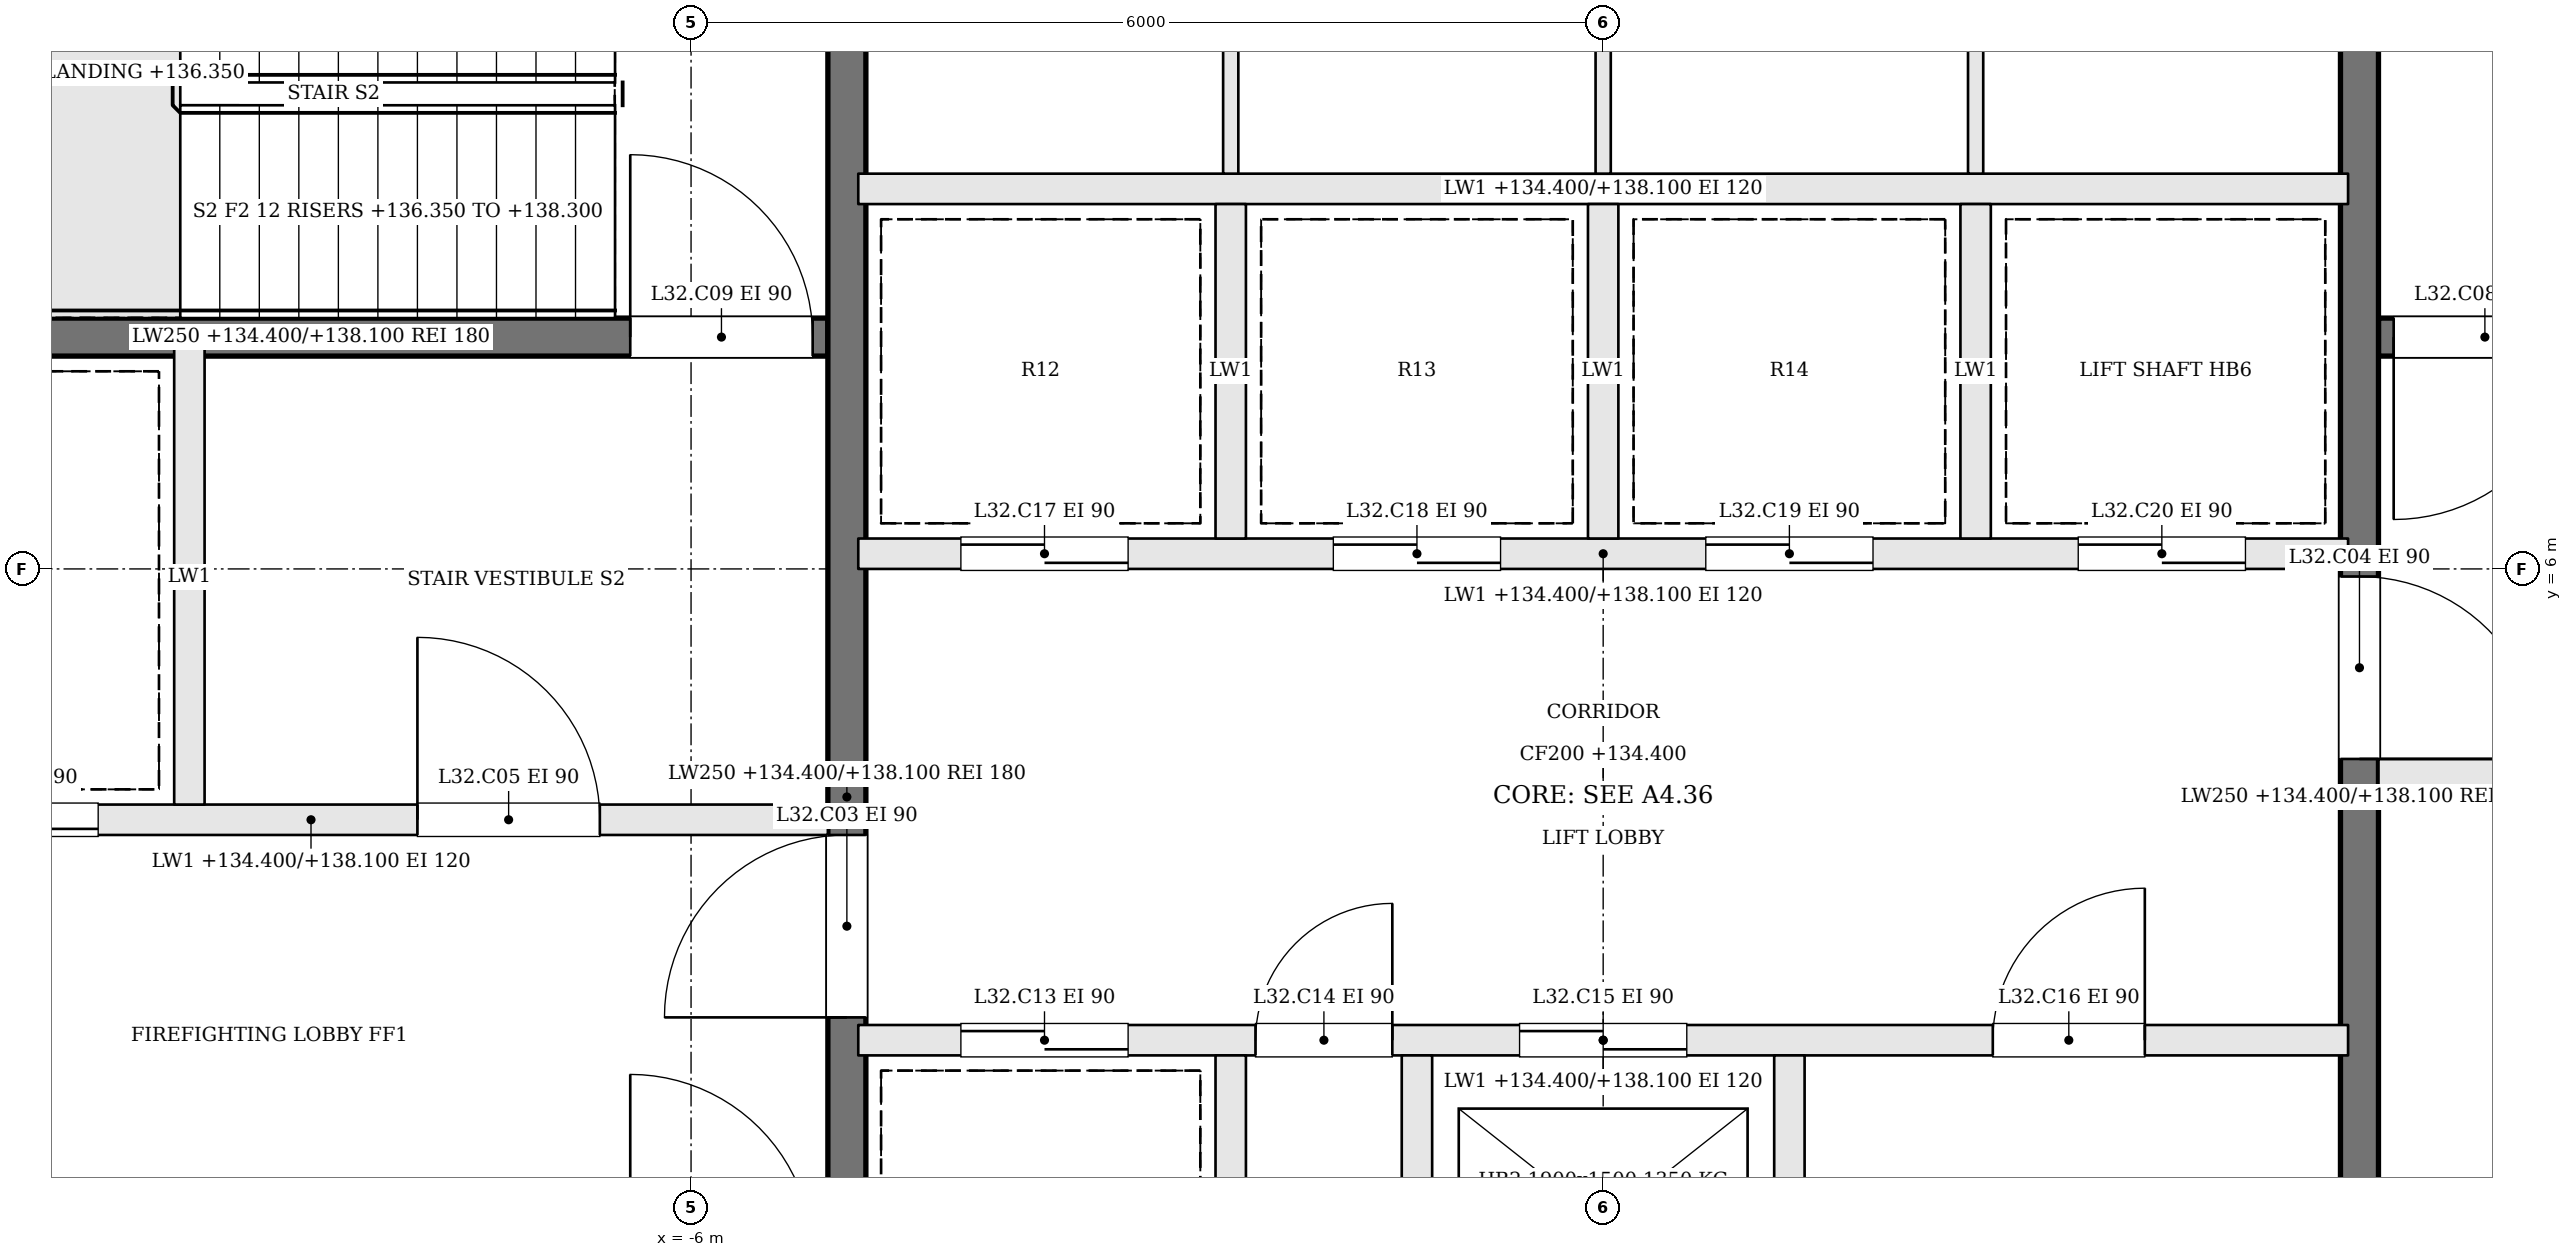
"""IFC4 building model, lengths in metres.
Left out: names, types, materials, properties, quantities, classifications, styles, units other than length and angle.
Written with IfcOpenShell. Run it as: python <this file> out.ifc"""

import sys

from ifc_helpers import new_model, si_unit, direction, frame, frame_2d, origin, place, context, subcontext, project, spatial, rectangle, extrude, element, fill, save


model = new_model("IFC4")
c1 = context("Model", 3, precision=1e-05, world=origin(), true_north=direction((0.0, 1.0)))
c2 = subcontext(c1, "Body", "Model", "MODEL_VIEW")
j1 = project(units=[si_unit("LENGTHUNIT", "METRE"), si_unit("PLANEANGLEUNIT", "RADIAN")], contexts=[c1])
p1 = place(None, origin())
s1 = spatial("IfcSite", under=j1, at=p1, CompositionType="ELEMENT")
p2 = place(p1, origin())
s2 = spatial("IfcBuilding", under=s1, at=p2, CompositionType="ELEMENT")
p3 = place(p2, frame((0.0, 0.0, 134.4)))
s3 = spatial("IfcBuildingStorey", under=s2, at=p3, CompositionType="ELEMENT", Elevation=134.4)
p4 = place(p3, frame((11.9, 7.525, 0.0), z_axis=(0.0, 0.0, 1.0), x_axis=(-1.0, 0.0, 0.0)))
e1 = element("IfcWall", 1, at=p4, inside=s3, PredefinedType="SOLIDWALL", context=c2, shape_type="SweptSolid", body=[
    extrude(rectangle(XDim=6.8, YDim=0.25, at=frame_2d((3.4, 0.0))), origin(), (0.0, 0.0, 1.0), 3.7),
])
p5 = place(p4, frame((5.5, 0.0, 0.0)))
e2 = element("IfcOpeningElement", 2, at=p5, cuts=e1, PredefinedType="OPENING", context=c2, shape_type="SweptSolid", body=[
    extrude(rectangle(XDim=1.2, YDim=2.1, at=frame_2d((0.6, 1.05))), frame((0.0, 0.135, 0.0), z_axis=(0.0, -1.0, 0.0), x_axis=(1.0, 0.0, 0.0)), (0.0, 0.0, 1.0), 0.27),
])
p6 = place(p3, frame((-11.9, 4.35, 0.0), z_axis=(0.0, 0.0, 1.0), x_axis=(1.0, 0.0, 0.0)))
e3 = element("IfcWall", 3, at=p6, inside=s3, PredefinedType="SOLIDWALL", context=c2, shape_type="SweptSolid", body=[
    extrude(rectangle(XDim=6.8, YDim=0.2, at=frame_2d((3.4, 0.0))), origin(), (0.0, 0.0, 1.0), 3.7),
])
p7 = place(p6, frame((4.1, 0.0, 0.0)))
e4 = element("IfcOpeningElement", 4, at=p7, cuts=e3, PredefinedType="OPENING", context=c2, shape_type="SweptSolid", body=[
    extrude(rectangle(XDim=1.2, YDim=2.1, at=frame_2d((0.6, 1.05))), frame((0.0, 0.11, 0.0), z_axis=(0.0, -1.0, 0.0), x_axis=(1.0, 0.0, 0.0)), (0.0, 0.0, 1.0), 0.22),
])
p8 = place(p6, frame((0.8, 0.0, 0.0)))
e5 = element("IfcOpeningElement", 5, at=p8, cuts=e3, PredefinedType="OPENING", context=c2, shape_type="SweptSolid", body=[
    extrude(rectangle(XDim=1.2, YDim=2.1, at=frame_2d((0.6, 1.05))), frame((0.0, 0.11, 0.0), z_axis=(0.0, -1.0, 0.0), x_axis=(1.0, 0.0, 0.0)), (0.0, 0.0, 1.0), 0.22),
])
p9 = place(p3, frame((11.9, 4.65, 0.0), z_axis=(0.0, 0.0, 1.0), x_axis=(-1.0, 0.0, 0.0)))
e6 = element("IfcWall", 6, at=p9, inside=s3, PredefinedType="SOLIDWALL", context=c2, shape_type="SweptSolid", body=[
    extrude(rectangle(XDim=6.8, YDim=0.2, at=frame_2d((3.4, 0.0))), origin(), (0.0, 0.0, 1.0), 3.7),
])
p10 = place(p9, frame((4.1, 0.0, 0.0)))
e7 = element("IfcOpeningElement", 7, at=p10, cuts=e6, PredefinedType="OPENING", context=c2, shape_type="SweptSolid", body=[
    extrude(rectangle(XDim=1.2, YDim=2.1, at=frame_2d((0.6, 1.05))), frame((0.0, 0.11, 0.0), z_axis=(0.0, -1.0, 0.0), x_axis=(1.0, 0.0, 0.0)), (0.0, 0.0, 1.0), 0.22),
])
p11 = place(p9, frame((0.8, 0.0, 0.0)))
e8 = element("IfcOpeningElement", 8, at=p11, cuts=e6, PredefinedType="OPENING", context=c2, shape_type="SweptSolid", body=[
    extrude(rectangle(XDim=1.2, YDim=2.1, at=frame_2d((0.6, 1.05))), frame((0.0, 0.11, 0.0), z_axis=(0.0, -1.0, 0.0), x_axis=(1.0, 0.0, 0.0)), (0.0, 0.0, 1.0), 0.22),
])
p12 = place(p3, frame((-11.9, 7.525, 0.0), z_axis=(0.0, 0.0, 1.0), x_axis=(1.0, 0.0, 0.0)))
e9 = element("IfcWall", 9, at=p12, inside=s3, PredefinedType="SOLIDWALL", context=c2, shape_type="SweptSolid", body=[
    extrude(rectangle(XDim=6.8, YDim=0.25, at=frame_2d((3.4, 0.0))), origin(), (0.0, 0.0, 1.0), 3.7),
])
p13 = place(p12, frame((5.5, 0.0, 0.0)))
e10 = element("IfcOpeningElement", 10, at=p13, cuts=e9, PredefinedType="OPENING", context=c2, shape_type="SweptSolid", body=[
    extrude(rectangle(XDim=1.2, YDim=2.1, at=frame_2d((0.6, 1.05))), frame((0.0, 0.135, 0.0), z_axis=(0.0, -1.0, 0.0), x_axis=(1.0, 0.0, 0.0)), (0.0, 0.0, 1.0), 0.27),
])
p14 = place(p3, frame((-9.3, 4.45, 0.0), z_axis=(0.0, 0.0, 1.0), x_axis=(0.0, 1.0, 0.0)))
e11 = element("IfcWall", 11, at=p14, inside=s3, PredefinedType="SOLIDWALL", context=c2, shape_type="SweptSolid", body=[
    extrude(rectangle(XDim=3.0, YDim=0.2, at=frame_2d((1.5, 0.0))), origin(), (0.0, 0.0, 1.0), 3.7),
])
p15 = place(p3, frame((-4.975, -1.9, 0.0), z_axis=(0.0, 0.0, 1.0), x_axis=(0.0, 1.0, 0.0)))
e12 = element("IfcWall", 12, at=p15, inside=s3, PredefinedType="SOLIDWALL", context=c2, shape_type="SweptSolid", body=[
    extrude(rectangle(XDim=12.8, YDim=0.25, at=frame_2d((6.4, 0.0))), origin(), (0.0, 0.0, 1.0), 3.7),
])
p16 = place(p15, frame((4.95, 0.0, 0.0)))
e13 = element("IfcOpeningElement", 13, at=p16, cuts=e12, PredefinedType="OPENING", context=c2, shape_type="SweptSolid", body=[
    extrude(rectangle(XDim=1.2, YDim=2.1, at=frame_2d((0.6, 1.05))), frame((0.0, 0.135, 0.0), z_axis=(0.0, -1.0, 0.0), x_axis=(1.0, 0.0, 0.0)), (0.0, 0.0, 1.0), 0.27),
])
p17 = place(p3, frame((4.975, 10.9, 0.0), z_axis=(0.0, 0.0, 1.0), x_axis=(0.0, -1.0, 0.0)))
e14 = element("IfcWall", 14, at=p17, inside=s3, PredefinedType="SOLIDWALL", context=c2, shape_type="SweptSolid", body=[
    extrude(rectangle(XDim=12.8, YDim=0.25, at=frame_2d((6.4, 0.0))), origin(), (0.0, 0.0, 1.0), 3.7),
])
p18 = place(p17, frame((4.95, 0.0, 0.0)))
e15 = element("IfcOpeningElement", 15, at=p18, cuts=e14, PredefinedType="OPENING", context=c2, shape_type="SweptSolid", body=[
    extrude(rectangle(XDim=1.2, YDim=2.1, at=frame_2d((0.6, 1.05))), frame((0.0, 0.135, 0.0), z_axis=(0.0, -1.0, 0.0), x_axis=(1.0, 0.0, 0.0)), (0.0, 0.0, 1.0), 0.27),
])
p19 = place(p3, frame((-4.9, 2.9, 0.0), z_axis=(0.0, 0.0, 1.0), x_axis=(1.0, 0.0, 0.0)))
e16 = element("IfcWall", 16, at=p19, inside=s3, PredefinedType="SOLIDWALL", context=c2, shape_type="SweptSolid", body=[
    extrude(rectangle(XDim=9.8, YDim=0.2, at=frame_2d((4.9, 0.0))), origin(), (0.0, 0.0, 1.0), 3.7),
])
p20 = place(p19, frame((0.675, 0.0, 0.0)))
e17 = element("IfcOpeningElement", 17, at=p20, cuts=e16, PredefinedType="OPENING", context=c2, shape_type="SweptSolid", body=[
    extrude(rectangle(XDim=1.1, YDim=2.1, at=frame_2d((0.55, 1.05))), frame((0.0, 0.11, 0.0), z_axis=(0.0, -1.0, 0.0), x_axis=(1.0, 0.0, 0.0)), (0.0, 0.0, 1.0), 0.22),
])
p21 = place(p19, frame((2.613, 0.0, 0.0)))
e18 = element("IfcOpeningElement", 18, at=p21, cuts=e16, PredefinedType="OPENING", context=c2, shape_type="SweptSolid", body=[
    extrude(rectangle(XDim=0.9, YDim=2.1, at=frame_2d((0.45, 1.05))), frame((0.0, 0.11, 0.0), z_axis=(0.0, -1.0, 0.0), x_axis=(1.0, 0.0, 0.0)), (0.0, 0.0, 1.0), 0.22),
])
p22 = place(p19, frame((4.35, 0.0, 0.0)))
e19 = element("IfcOpeningElement", 19, at=p22, cuts=e16, PredefinedType="OPENING", context=c2, shape_type="SweptSolid", body=[
    extrude(rectangle(XDim=1.1, YDim=2.1, at=frame_2d((0.55, 1.05))), frame((0.0, 0.11, 0.0), z_axis=(0.0, -1.0, 0.0), x_axis=(1.0, 0.0, 0.0)), (0.0, 0.0, 1.0), 0.22),
])
p23 = place(p19, frame((7.463, 0.0, 0.0)))
e20 = element("IfcOpeningElement", 20, at=p23, cuts=e16, PredefinedType="OPENING", context=c2, shape_type="SweptSolid", body=[
    extrude(rectangle(XDim=1.0, YDim=2.1, at=frame_2d((0.5, 1.05))), frame((0.0, 0.11, 0.0), z_axis=(0.0, -1.0, 0.0), x_axis=(1.0, 0.0, 0.0)), (0.0, 0.0, 1.0), 0.22),
])
p24 = place(p3, frame((-4.9, 6.1, 0.0), z_axis=(0.0, 0.0, 1.0), x_axis=(1.0, 0.0, 0.0)))
e21 = element("IfcWall", 21, at=p24, inside=s3, PredefinedType="SOLIDWALL", context=c2, shape_type="SweptSolid", body=[
    extrude(rectangle(XDim=9.8, YDim=0.2, at=frame_2d((4.9, 0.0))), origin(), (0.0, 0.0, 1.0), 3.7),
])
p25 = place(p24, frame((0.675, 0.0, 0.0)))
e22 = element("IfcOpeningElement", 22, at=p25, cuts=e21, PredefinedType="OPENING", context=c2, shape_type="SweptSolid", body=[
    extrude(rectangle(XDim=1.1, YDim=2.1, at=frame_2d((0.55, 1.05))), frame((0.0, 0.11, 0.0), z_axis=(0.0, -1.0, 0.0), x_axis=(1.0, 0.0, 0.0)), (0.0, 0.0, 1.0), 0.22),
])
p26 = place(p24, frame((3.125, 0.0, 0.0)))
e23 = element("IfcOpeningElement", 23, at=p26, cuts=e21, PredefinedType="OPENING", context=c2, shape_type="SweptSolid", body=[
    extrude(rectangle(XDim=1.1, YDim=2.1, at=frame_2d((0.55, 1.05))), frame((0.0, 0.11, 0.0), z_axis=(0.0, -1.0, 0.0), x_axis=(1.0, 0.0, 0.0)), (0.0, 0.0, 1.0), 0.22),
])
p27 = place(p24, frame((5.575, 0.0, 0.0)))
e24 = element("IfcOpeningElement", 24, at=p27, cuts=e21, PredefinedType="OPENING", context=c2, shape_type="SweptSolid", body=[
    extrude(rectangle(XDim=1.1, YDim=2.1, at=frame_2d((0.55, 1.05))), frame((0.0, 0.11, 0.0), z_axis=(0.0, -1.0, 0.0), x_axis=(1.0, 0.0, 0.0)), (0.0, 0.0, 1.0), 0.22),
])
p28 = place(p24, frame((8.025, 0.0, 0.0)))
e25 = element("IfcOpeningElement", 25, at=p28, cuts=e21, PredefinedType="OPENING", context=c2, shape_type="SweptSolid", body=[
    extrude(rectangle(XDim=1.1, YDim=2.1, at=frame_2d((0.55, 1.05))), frame((0.0, 0.11, 0.0), z_axis=(0.0, -1.0, 0.0), x_axis=(1.0, 0.0, 0.0)), (0.0, 0.0, 1.0), 0.22),
])
p29 = place(p3, frame((-4.9, 8.5, 0.0), z_axis=(0.0, 0.0, 1.0), x_axis=(1.0, 0.0, 0.0)))
e26 = element("IfcWall", 26, at=p29, inside=s3, PredefinedType="SOLIDWALL", context=c2, shape_type="SweptSolid", body=[
    extrude(rectangle(XDim=9.8, YDim=0.2, at=frame_2d((4.9, 0.0))), origin(), (0.0, 0.0, 1.0), 3.7),
])
for number, where, z_axis, x_axis in (
    (27, (-2.45, 0.6, 0.0), (0.0, 0.0, 1.0), (0.0, 1.0, 0.0)),
    (28, (-1.225, 0.6, 0.0), (0.0, 0.0, 1.0), (0.0, 1.0, 0.0)),
    (29, (1.225, 0.6, 0.0), (0.0, 0.0, 1.0), (0.0, 1.0, 0.0)),
    (30, (-2.45, 6.2, 0.0), (0.0, 0.0, 1.0), (0.0, 1.0, 0.0)),
    (31, (0.0, 6.2, 0.0), (0.0, 0.0, 1.0), (0.0, 1.0, 0.0)),
    (32, (2.45, 6.2, 0.0), (0.0, 0.0, 1.0), (0.0, 1.0, 0.0)),
):
    element("IfcWall", number, at=place(p3, frame(where, z_axis=z_axis, x_axis=x_axis)), inside=s3, PredefinedType="SOLIDWALL", context=c2, shape_type="SweptSolid", body=[
        extrude(rectangle(XDim=2.2, YDim=0.2, at=frame_2d((1.1, 0.0))), origin(), (0.0, 0.0, 1.0), 3.7),
    ])
for number, where, z_axis, x_axis in (
    (33, (-2.45, 8.6, 0.0), (0.0, 0.0, 1.0), (0.0, 1.0, 0.0)),
    (34, (0.0, 8.6, 0.0), (0.0, 0.0, 1.0), (0.0, 1.0, 0.0)),
    (35, (2.45, 8.6, 0.0), (0.0, 0.0, 1.0), (0.0, 1.0, 0.0)),
):
    element("IfcWall", number, at=place(p3, frame(where, z_axis=z_axis, x_axis=x_axis)), inside=s3, PredefinedType="PARTITIONING", context=c2, shape_type="SweptSolid", body=[
        extrude(rectangle(XDim=2.3, YDim=0.1, at=frame_2d((1.15, 0.0))), origin(), (0.0, 0.0, 1.0), 3.7),
    ])
p30 = place(p16, origin())
e36 = element("IfcDoor", 36, at=p30, inside=s3, OperationType="SINGLE_SWING_LEFT", PredefinedType="DOOR", context=c2, shape_type="SweptSolid", body=[
    extrude(rectangle(XDim=1.2, YDim=2.1, at=frame_2d((0.6, 1.05))), frame((0.0, 0.025, 0.0), z_axis=(0.0, -1.0, 0.0), x_axis=(1.0, 0.0, 0.0)), (0.0, 0.0, 1.0), 0.05),
])
fill(e13, e36)
p31 = place(p18, origin())
e37 = element("IfcDoor", 37, at=p31, inside=s3, OperationType="SINGLE_SWING_RIGHT", PredefinedType="DOOR", context=c2, shape_type="SweptSolid", body=[
    extrude(rectangle(XDim=1.2, YDim=2.1, at=frame_2d((0.6, 1.05))), frame((0.0, 0.025, 0.0), z_axis=(0.0, -1.0, 0.0), x_axis=(1.0, 0.0, 0.0)), (0.0, 0.0, 1.0), 0.05),
])
fill(e15, e37)
p32 = place(p7, origin())
e38 = element("IfcDoor", 38, at=p32, inside=s3, OperationType="SINGLE_SWING_LEFT", PredefinedType="DOOR", context=c2, shape_type="SweptSolid", body=[
    extrude(rectangle(XDim=1.2, YDim=2.1, at=frame_2d((0.6, 1.05))), frame((0.0, 0.025, 0.0), z_axis=(0.0, -1.0, 0.0), x_axis=(1.0, 0.0, 0.0)), (0.0, 0.0, 1.0), 0.05),
])
fill(e4, e38)
p33 = place(p5, origin())
e39 = element("IfcDoor", 39, at=p33, inside=s3, OperationType="SINGLE_SWING_RIGHT", PredefinedType="DOOR", context=c2, shape_type="SweptSolid", body=[
    extrude(rectangle(XDim=1.2, YDim=2.1, at=frame_2d((0.6, 1.05))), frame((0.0, 0.025, 0.0), z_axis=(0.0, -1.0, 0.0), x_axis=(1.0, 0.0, 0.0)), (0.0, 0.0, 1.0), 0.05),
])
fill(e2, e39)
p34 = place(p13, origin())
e40 = element("IfcDoor", 40, at=p34, inside=s3, OperationType="SINGLE_SWING_LEFT", PredefinedType="DOOR", context=c2, shape_type="SweptSolid", body=[
    extrude(rectangle(XDim=1.2, YDim=2.1, at=frame_2d((0.6, 1.05))), frame((0.0, 0.025, 0.0), z_axis=(0.0, -1.0, 0.0), x_axis=(1.0, 0.0, 0.0)), (0.0, 0.0, 1.0), 0.05),
])
fill(e10, e40)
p35 = place(p8, origin())
e41 = element("IfcDoor", 41, at=p35, inside=s3, OperationType="SLIDING_TO_RIGHT", PredefinedType="DOOR", context=c2, shape_type="SweptSolid", body=[
    extrude(rectangle(XDim=1.2, YDim=2.1, at=frame_2d((0.6, 1.05))), frame((0.0, 0.025, 0.0), z_axis=(0.0, -1.0, 0.0), x_axis=(1.0, 0.0, 0.0)), (0.0, 0.0, 1.0), 0.05),
])
fill(e5, e41)
p36 = place(p20, origin())
e42 = element("IfcDoor", 42, at=p36, inside=s3, OperationType="SLIDING_TO_RIGHT", PredefinedType="DOOR", context=c2, shape_type="SweptSolid", body=[
    extrude(rectangle(XDim=1.1, YDim=2.1, at=frame_2d((0.55, 1.05))), frame((0.0, 0.025, 0.0), z_axis=(0.0, -1.0, 0.0), x_axis=(1.0, 0.0, 0.0)), (0.0, 0.0, 1.0), 0.05),
])
fill(e17, e42)
p37 = place(p21, origin())
e43 = element("IfcDoor", 43, at=p37, inside=s3, OperationType="SINGLE_SWING_RIGHT", PredefinedType="DOOR", context=c2, shape_type="SweptSolid", body=[
    extrude(rectangle(XDim=0.9, YDim=2.1, at=frame_2d((0.45, 1.05))), frame((0.0, 0.025, 0.0), z_axis=(0.0, -1.0, 0.0), x_axis=(1.0, 0.0, 0.0)), (0.0, 0.0, 1.0), 0.05),
])
fill(e18, e43)
p38 = place(p22, origin())
e44 = element("IfcDoor", 44, at=p38, inside=s3, OperationType="SLIDING_TO_LEFT", PredefinedType="DOOR", context=c2, shape_type="SweptSolid", body=[
    extrude(rectangle(XDim=1.1, YDim=2.1, at=frame_2d((0.55, 1.05))), frame((0.0, 0.025, 0.0), z_axis=(0.0, -1.0, 0.0), x_axis=(1.0, 0.0, 0.0)), (0.0, 0.0, 1.0), 0.05),
])
fill(e19, e44)
p39 = place(p23, origin())
e45 = element("IfcDoor", 45, at=p39, inside=s3, OperationType="SINGLE_SWING_RIGHT", PredefinedType="DOOR", context=c2, shape_type="SweptSolid", body=[
    extrude(rectangle(XDim=1.0, YDim=2.1, at=frame_2d((0.5, 1.05))), frame((0.0, 0.025, 0.0), z_axis=(0.0, -1.0, 0.0), x_axis=(1.0, 0.0, 0.0)), (0.0, 0.0, 1.0), 0.05),
])
fill(e20, e45)
p40 = place(p25, origin())
e46 = element("IfcDoor", 46, at=p40, inside=s3, OperationType="SLIDING_TO_RIGHT", PredefinedType="DOOR", context=c2, shape_type="SweptSolid", body=[
    extrude(rectangle(XDim=1.1, YDim=2.1, at=frame_2d((0.55, 1.05))), frame((0.0, 0.025, 0.0), z_axis=(0.0, -1.0, 0.0), x_axis=(1.0, 0.0, 0.0)), (0.0, 0.0, 1.0), 0.05),
])
fill(e22, e46)
p41 = place(p26, origin())
e47 = element("IfcDoor", 47, at=p41, inside=s3, OperationType="SLIDING_TO_LEFT", PredefinedType="DOOR", context=c2, shape_type="SweptSolid", body=[
    extrude(rectangle(XDim=1.1, YDim=2.1, at=frame_2d((0.55, 1.05))), frame((0.0, 0.025, 0.0), z_axis=(0.0, -1.0, 0.0), x_axis=(1.0, 0.0, 0.0)), (0.0, 0.0, 1.0), 0.05),
])
fill(e23, e47)
p42 = place(p27, origin())
e48 = element("IfcDoor", 48, at=p42, inside=s3, OperationType="SLIDING_TO_RIGHT", PredefinedType="DOOR", context=c2, shape_type="SweptSolid", body=[
    extrude(rectangle(XDim=1.1, YDim=2.1, at=frame_2d((0.55, 1.05))), frame((0.0, 0.025, 0.0), z_axis=(0.0, -1.0, 0.0), x_axis=(1.0, 0.0, 0.0)), (0.0, 0.0, 1.0), 0.05),
])
fill(e24, e48)
p43 = place(p28, origin())
e49 = element("IfcDoor", 49, at=p43, inside=s3, OperationType="SLIDING_TO_LEFT", PredefinedType="DOOR", context=c2, shape_type="SweptSolid", body=[
    extrude(rectangle(XDim=1.1, YDim=2.1, at=frame_2d((0.55, 1.05))), frame((0.0, 0.025, 0.0), z_axis=(0.0, -1.0, 0.0), x_axis=(1.0, 0.0, 0.0)), (0.0, 0.0, 1.0), 0.05),
])
fill(e25, e49)
save(model, sys.argv[1])
